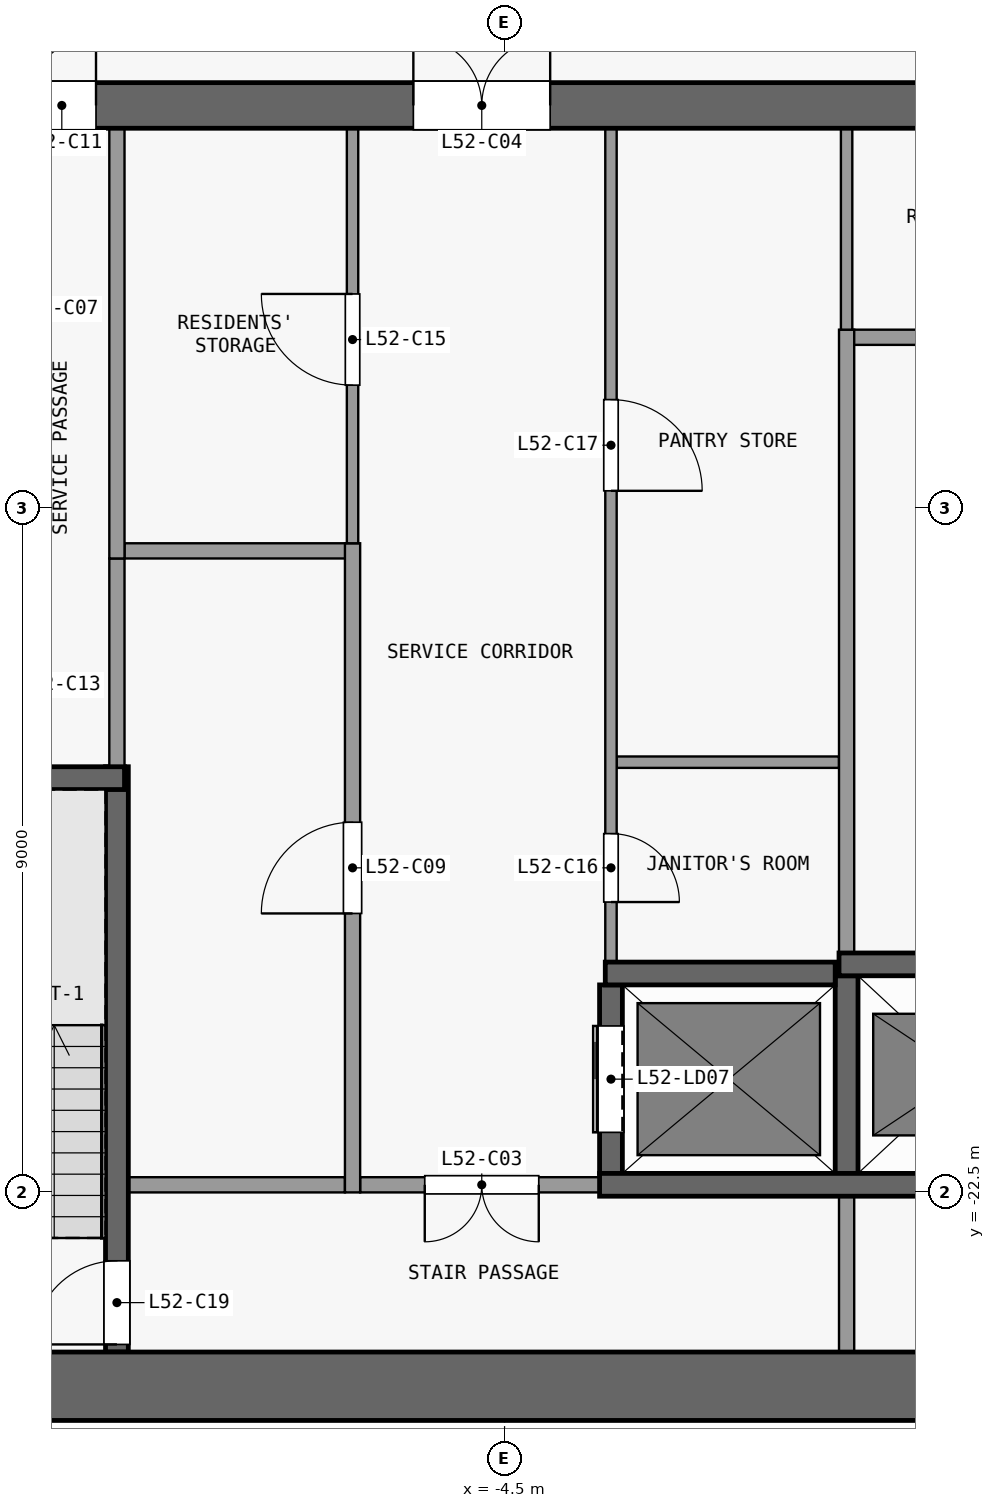
"""IFC4 building model, lengths in metres.
Left out: names, types, materials, properties, quantities, classifications, styles, units other than length and angle.
Written with IfcOpenShell. Run it as: python <this file> out.ifc"""

import sys

from ifc_helpers import new_model, si_unit, direction, frame, frame_2d, origin, place, context, subcontext, project, spatial, rectangle, extrude, element, fill, save


model = new_model("IFC4")
c1 = context("Model", 3, precision=1e-05, world=origin(), true_north=direction((0.0, 1.0)))
c2 = subcontext(c1, "Body", "Model", "MODEL_VIEW")
j1 = project(units=[si_unit("LENGTHUNIT", "METRE"), si_unit("PLANEANGLEUNIT", "RADIAN")], contexts=[c1])
p1 = place(None, origin())
s1 = spatial("IfcSite", under=j1, at=p1, CompositionType="ELEMENT")
p2 = place(p1, origin())
s2 = spatial("IfcBuilding", under=s1, at=p2, CompositionType="ELEMENT")
p3 = place(p2, frame((0.0, 0.0, 208.7)))
s3 = spatial("IfcBuildingStorey", under=s2, at=p3, CompositionType="ELEMENT", Elevation=208.7)
p4 = place(p3, frame((-13.2, -25.05, 0.0), z_axis=(0.0, 0.0, 1.0), x_axis=(1.0, 0.0, 0.0)))
e1 = element("IfcWall", 1, at=p4, inside=s3, PredefinedType="SHEAR", context=c2, shape_type="SweptSolid", body=[
    extrude(rectangle(XDim=26.4, YDim=0.9, at=frame_2d((13.2, 0.0))), origin(), (0.0, 0.0, 1.0), 3.3),
])
p5 = place(p3, frame((-13.2, -8.2, 0.0), z_axis=(0.0, 0.0, 1.0), x_axis=(1.0, 0.0, 0.0)))
e2 = element("IfcWall", 2, at=p5, inside=s3, PredefinedType="SHEAR", context=c2, shape_type="SweptSolid", body=[
    extrude(rectangle(XDim=26.4, YDim=0.6, at=frame_2d((13.2, 0.0))), origin(), (0.0, 0.0, 1.0), 3.3),
])
p6 = place(p5, frame((7.5, 0.0, 0.0)))
e3 = element("IfcOpeningElement", 3, at=p6, cuts=e2, PredefinedType="OPENING", context=c2, shape_type="SweptSolid", body=[
    extrude(rectangle(XDim=1.8, YDim=2.1, at=frame_2d((0.9, 1.05))), frame((0.0, 0.31, 0.0), z_axis=(0.0, -1.0, 0.0), x_axis=(1.0, 0.0, 0.0)), (0.0, 0.0, 1.0), 0.62),
])
p7 = place(p5, frame((17.1, 0.0, 0.0)))
e4 = element("IfcOpeningElement", 4, at=p7, cuts=e2, PredefinedType="OPENING", context=c2, shape_type="SweptSolid", body=[
    extrude(rectangle(XDim=1.8, YDim=2.1, at=frame_2d((0.9, 1.05))), frame((0.0, 0.31, 0.0), z_axis=(0.0, -1.0, 0.0), x_axis=(1.0, 0.0, 0.0)), (0.0, 0.0, 1.0), 0.62),
])
p8 = place(p5, frame((2.425, 0.0, 0.0)))
e5 = element("IfcOpeningElement", 5, at=p8, cuts=e2, PredefinedType="OPENING", context=c2, shape_type="SweptSolid", body=[
    extrude(rectangle(XDim=0.9, YDim=2.1, at=frame_2d((0.45, 1.05))), frame((0.0, 0.31, 0.0), z_axis=(0.0, -1.0, 0.0), x_axis=(1.0, 0.0, 0.0)), (0.0, 0.0, 1.0), 0.62),
])
p9 = place(p5, frame((23.075, 0.0, 0.0)))
e6 = element("IfcOpeningElement", 6, at=p9, cuts=e2, PredefinedType="OPENING", context=c2, shape_type="SweptSolid", body=[
    extrude(rectangle(XDim=0.9, YDim=2.1, at=frame_2d((0.45, 1.05))), frame((0.0, 0.31, 0.0), z_axis=(0.0, -1.0, 0.0), x_axis=(1.0, 0.0, 0.0)), (0.0, 0.0, 1.0), 0.62),
])
p10 = place(p3, frame((-9.45, -22.4, 0.0), z_axis=(0.0, 0.0, 1.0), x_axis=(1.0, 0.0, 0.0)))
e7 = element("IfcWall", 7, at=p10, inside=s3, PredefinedType="PARTITIONING", context=c2, shape_type="SweptSolid", body=[
    extrude(rectangle(XDim=2.85, YDim=0.2, at=frame_2d((1.425, 0.0))), origin(), (0.0, 0.0, 1.0), 3.3),
])
p11 = place(p3, frame((-3.25, -22.4, 0.0), z_axis=(0.0, 0.0, 1.0), x_axis=(-1.0, 0.0, 0.0)))
e8 = element("IfcWall", 8, at=p11, inside=s3, PredefinedType="PARTITIONING", context=c2, shape_type="SweptSolid", body=[
    extrude(rectangle(XDim=3.15, YDim=0.2, at=frame_2d((1.575, 0.0))), origin(), (0.0, 0.0, 1.0), 3.3),
])
p12 = place(p11, frame((0.8, 0.0, 0.0)))
e9 = element("IfcOpeningElement", 9, at=p12, cuts=e8, PredefinedType="OPENING", context=c2, shape_type="SweptSolid", body=[
    extrude(rectangle(XDim=1.5, YDim=2.1, at=frame_2d((0.75, 1.05))), frame((0.0, 0.11, 0.0), z_axis=(0.0, -1.0, 0.0), x_axis=(1.0, 0.0, 0.0)), (0.0, 0.0, 1.0), 0.22),
])
p13 = place(p3, frame((-3.25, -22.4, 0.0), z_axis=(0.0, 0.0, 1.0), x_axis=(1.0, 0.0, 0.0)))
e10 = element("IfcWall", 10, at=p13, inside=s3, PredefinedType="SHEAR", context=c2, shape_type="SweptSolid", body=[
    extrude(rectangle(XDim=6.5, YDim=0.3, at=frame_2d((3.25, 0.0))), origin(), (0.0, 0.0, 1.0), 3.3),
])
p14 = place(p3, frame((-3.175, -19.62, 0.0), z_axis=(0.0, 0.0, 1.0), x_axis=(1.0, 0.0, 0.0)))
e11 = element("IfcWall", 11, at=p14, inside=s3, PredefinedType="SHEAR", context=c2, shape_type="SweptSolid", body=[
    extrude(rectangle(XDim=3.025, YDim=0.3, at=frame_2d((1.513, 0.0))), origin(), (0.0, 0.0, 1.0), 3.3),
])
p15 = place(p3, frame((-0.1, -19.5, 0.0), z_axis=(0.0, 0.0, 1.0), x_axis=(1.0, 0.0, 0.0)))
e12 = element("IfcWall", 12, at=p15, inside=s3, PredefinedType="SHEAR", context=c2, shape_type="SweptSolid", body=[
    extrude(rectangle(XDim=3.3, YDim=0.3, at=frame_2d((1.65, 0.0))), origin(), (0.0, 0.0, 1.0), 3.3),
])
p16 = place(p3, frame((-12.6, -17.05, 0.0), z_axis=(0.0, 0.0, 1.0), x_axis=(1.0, 0.0, 0.0)))
e13 = element("IfcWall", 13, at=p16, inside=s3, PredefinedType="SHEAR", context=c2, shape_type="SweptSolid", body=[
    extrude(rectangle(XDim=3.1, YDim=0.3, at=frame_2d((1.55, 0.0))), origin(), (0.0, 0.0, 1.0), 3.3),
])
p17 = place(p3, frame((-3.025, -16.84, 0.0), z_axis=(0.0, 0.0, 1.0), x_axis=(1.0, 0.0, 0.0)))
e14 = element("IfcWall", 14, at=p17, inside=s3, PredefinedType="PARTITIONING", context=c2, shape_type="SweptSolid", body=[
    extrude(rectangle(XDim=2.925, YDim=0.15, at=frame_2d((1.462, 0.0))), origin(), (0.0, 0.0, 1.0), 3.3),
])
p18 = place(p3, frame((-9.5, -14.06, 0.0), z_axis=(0.0, 0.0, 1.0), x_axis=(1.0, 0.0, 0.0)))
e15 = element("IfcWall", 15, at=p18, inside=s3, PredefinedType="PARTITIONING", context=c2, shape_type="SweptSolid", body=[
    extrude(rectangle(XDim=3.075, YDim=0.2, at=frame_2d((1.538, 0.0))), origin(), (0.0, 0.0, 1.0), 3.3),
])
p19 = place(p3, frame((-0.075, -11.25, 0.0), z_axis=(0.0, 0.0, 1.0), x_axis=(1.0, 0.0, 0.0)))
e16 = element("IfcWall", 16, at=p19, inside=s3, PredefinedType="PARTITIONING", context=c2, shape_type="SweptSolid", body=[
    extrude(rectangle(XDim=3.25, YDim=0.2, at=frame_2d((1.625, 0.0))), origin(), (0.0, 0.0, 1.0), 3.3),
])
p20 = place(p3, frame((-9.6, -24.6, 0.0), z_axis=(0.0, 0.0, 1.0), x_axis=(0.0, 1.0, 0.0)))
e17 = element("IfcWall", 17, at=p20, inside=s3, PredefinedType="SHEAR", context=c2, shape_type="SweptSolid", body=[
    extrude(rectangle(XDim=7.7, YDim=0.3, at=frame_2d((3.85, 0.0))), origin(), (0.0, 0.0, 1.0), 3.3),
])
p21 = place(p20, frame((0.1, 0.0, 0.0)))
e18 = element("IfcOpeningElement", 18, at=p21, cuts=e17, PredefinedType="OPENING", context=c2, shape_type="SweptSolid", body=[
    extrude(rectangle(XDim=1.1, YDim=2.1, at=frame_2d((0.55, 1.05))), frame((0.0, 0.16, 0.0), z_axis=(0.0, -1.0, 0.0), x_axis=(1.0, 0.0, 0.0)), (0.0, 0.0, 1.0), 0.32),
])
p22 = place(p3, frame((-9.6, -16.9, 0.0), z_axis=(0.0, 0.0, 1.0), x_axis=(0.0, 1.0, 0.0)))
e19 = element("IfcWall", 19, at=p22, inside=s3, PredefinedType="PARTITIONING", context=c2, shape_type="SweptSolid", body=[
    extrude(rectangle(XDim=2.74, YDim=0.2, at=frame_2d((1.37, 0.0))), origin(), (0.0, 0.0, 1.0), 3.3),
])
p23 = place(p3, frame((-9.6, -14.16, 0.0), z_axis=(0.0, 0.0, 1.0), x_axis=(0.0, 1.0, 0.0)))
e20 = element("IfcWall", 20, at=p23, inside=s3, PredefinedType="PARTITIONING", context=c2, shape_type="SweptSolid", body=[
    extrude(rectangle(XDim=5.66, YDim=0.2, at=frame_2d((2.83, 0.0))), origin(), (0.0, 0.0, 1.0), 3.3),
])
p24 = place(p3, frame((-6.5, -22.5, 0.0), z_axis=(0.0, 0.0, 1.0), x_axis=(0.0, 1.0, 0.0)))
e21 = element("IfcWall", 21, at=p24, inside=s3, PredefinedType="PARTITIONING", context=c2, shape_type="SweptSolid", body=[
    extrude(rectangle(XDim=8.54, YDim=0.2, at=frame_2d((4.27, 0.0))), origin(), (0.0, 0.0, 1.0), 3.3),
])
p25 = place(p24, frame((3.67, 0.0, 0.0)))
e22 = element("IfcOpeningElement", 22, at=p25, cuts=e21, PredefinedType="OPENING", context=c2, shape_type="SweptSolid", body=[
    extrude(rectangle(XDim=1.2, YDim=2.1, at=frame_2d((0.6, 1.05))), frame((0.0, 0.11, 0.0), z_axis=(0.0, -1.0, 0.0), x_axis=(1.0, 0.0, 0.0)), (0.0, 0.0, 1.0), 0.22),
])
p26 = place(p3, frame((-6.5, -13.96, 0.0), z_axis=(0.0, 0.0, 1.0), x_axis=(0.0, 1.0, 0.0)))
e23 = element("IfcWall", 23, at=p26, inside=s3, PredefinedType="PARTITIONING", context=c2, shape_type="SweptSolid", body=[
    extrude(rectangle(XDim=5.46, YDim=0.15, at=frame_2d((2.73, 0.0))), origin(), (0.0, 0.0, 1.0), 3.3),
])
p27 = place(p26, frame((2.08, 0.0, 0.0)))
e24 = element("IfcOpeningElement", 24, at=p27, cuts=e23, PredefinedType="OPENING", context=c2, shape_type="SweptSolid", body=[
    extrude(rectangle(XDim=1.2, YDim=2.1, at=frame_2d((0.6, 1.05))), frame((0.0, 0.085, 0.0), z_axis=(0.0, -1.0, 0.0), x_axis=(1.0, 0.0, 0.0)), (0.0, 0.0, 1.0), 0.17),
])
p28 = place(p3, frame((-3.1, -22.25, 0.0), z_axis=(0.0, 0.0, 1.0), x_axis=(0.0, 1.0, 0.0)))
e25 = element("IfcWall", 25, at=p28, inside=s3, PredefinedType="SHEAR", context=c2, shape_type="SweptSolid", body=[
    extrude(rectangle(XDim=2.48, YDim=0.3, at=frame_2d((1.24, 0.0))), origin(), (0.0, 0.0, 1.0), 3.3),
])
p29 = place(p28, frame((0.54, 0.0, 0.0)))
e26 = element("IfcOpeningElement", 26, at=p29, cuts=e25, PredefinedType="OPENING", context=c2, shape_type="SweptSolid", body=[
    extrude(rectangle(XDim=1.4, YDim=2.1, at=frame_2d((0.7, 1.05))), frame((0.0, 0.16, 0.0), z_axis=(0.0, -1.0, 0.0), x_axis=(1.0, 0.0, 0.0)), (0.0, 0.0, 1.0), 0.32),
])
p30 = place(p3, frame((-3.1, -8.5, 0.0), z_axis=(0.0, 0.0, 1.0), x_axis=(0.0, -1.0, 0.0)))
e27 = element("IfcWall", 27, at=p30, inside=s3, PredefinedType="PARTITIONING", context=c2, shape_type="SweptSolid", body=[
    extrude(rectangle(XDim=10.97, YDim=0.15, at=frame_2d((5.485, 0.0))), origin(), (0.0, 0.0, 1.0), 3.3),
])
p31 = place(p30, frame((9.28, 0.0, 0.0)))
e28 = element("IfcOpeningElement", 28, at=p31, cuts=e27, PredefinedType="OPENING", context=c2, shape_type="SweptSolid", body=[
    extrude(rectangle(XDim=0.9, YDim=2.1, at=frame_2d((0.45, 1.05))), frame((0.0, 0.085, 0.0), z_axis=(0.0, -1.0, 0.0), x_axis=(1.0, 0.0, 0.0)), (0.0, 0.0, 1.0), 0.17),
])
p32 = place(p30, frame((3.57, 0.0, 0.0)))
e29 = element("IfcOpeningElement", 29, at=p32, cuts=e27, PredefinedType="OPENING", context=c2, shape_type="SweptSolid", body=[
    extrude(rectangle(XDim=1.2, YDim=2.1, at=frame_2d((0.6, 1.05))), frame((0.0, 0.085, 0.0), z_axis=(0.0, -1.0, 0.0), x_axis=(1.0, 0.0, 0.0)), (0.0, 0.0, 1.0), 0.17),
])
p33 = place(p3, frame((0.0, -24.6, 0.0), z_axis=(0.0, 0.0, 1.0), x_axis=(0.0, 1.0, 0.0)))
e30 = element("IfcWall", 30, at=p33, inside=s3, PredefinedType="PARTITIONING", context=c2, shape_type="SweptSolid", body=[
    extrude(rectangle(XDim=2.05, YDim=0.2, at=frame_2d((1.025, 0.0))), origin(), (0.0, 0.0, 1.0), 3.3),
])
p34 = place(p3, frame((0.0, -22.25, 0.0), z_axis=(0.0, 0.0, 1.0), x_axis=(0.0, 1.0, 0.0)))
e31 = element("IfcWall", 31, at=p34, inside=s3, PredefinedType="SHEAR", context=c2, shape_type="SweptSolid", body=[
    extrude(rectangle(XDim=2.6, YDim=0.3, at=frame_2d((1.3, 0.0))), origin(), (0.0, 0.0, 1.0), 3.3),
])
p35 = place(p3, frame((0.0, -19.35, 0.0), z_axis=(0.0, 0.0, 1.0), x_axis=(0.0, 1.0, 0.0)))
e32 = element("IfcWall", 32, at=p35, inside=s3, PredefinedType="PARTITIONING", context=c2, shape_type="SweptSolid", body=[
    extrude(rectangle(XDim=8.2, YDim=0.2, at=frame_2d((4.1, 0.0))), origin(), (0.0, 0.0, 1.0), 3.3),
])
p36 = place(p3, frame((0.0, -11.15, 0.0), z_axis=(0.0, 0.0, 1.0), x_axis=(0.0, 1.0, 0.0)))
e33 = element("IfcWall", 33, at=p36, inside=s3, PredefinedType="PARTITIONING", context=c2, shape_type="SweptSolid", body=[
    extrude(rectangle(XDim=2.65, YDim=0.15, at=frame_2d((1.325, 0.0))), origin(), (0.0, 0.0, 1.0), 3.3),
])
p37 = place(p29, origin())
e34 = element("IfcDoor", 34, at=p37, inside=s3, OperationType="DOUBLE_DOOR_SLIDING", PredefinedType="DOOR", context=c2, shape_type="SweptSolid", body=[
    extrude(rectangle(XDim=1.4, YDim=2.1, at=frame_2d((0.7, 1.05))), frame((0.0, 0.025, 0.0), z_axis=(0.0, -1.0, 0.0), x_axis=(1.0, 0.0, 0.0)), (0.0, 0.0, 1.0), 0.05),
])
fill(e26, e34)
p38 = place(p12, origin())
e35 = element("IfcDoor", 35, at=p38, inside=s3, OperationType="DOUBLE_DOOR_SINGLE_SWING", PredefinedType="DOOR", context=c2, shape_type="SweptSolid", body=[
    extrude(rectangle(XDim=1.5, YDim=2.1, at=frame_2d((0.75, 1.05))), frame((0.0, 0.025, 0.0), z_axis=(0.0, -1.0, 0.0), x_axis=(1.0, 0.0, 0.0)), (0.0, 0.0, 1.0), 0.05),
])
fill(e9, e35)
p39 = place(p6, origin())
e36 = element("IfcDoor", 36, at=p39, inside=s3, OperationType="DOUBLE_DOOR_SINGLE_SWING", PredefinedType="DOOR", context=c2, shape_type="SweptSolid", body=[
    extrude(rectangle(XDim=1.8, YDim=2.1, at=frame_2d((0.9, 1.05))), frame((0.0, 0.025, 0.0), z_axis=(0.0, -1.0, 0.0), x_axis=(1.0, 0.0, 0.0)), (0.0, 0.0, 1.0), 0.05),
])
fill(e3, e36)
p40 = place(p25, origin())
e37 = element("IfcDoor", 37, at=p40, inside=s3, OperationType="SINGLE_SWING_LEFT", PredefinedType="DOOR", context=c2, shape_type="SweptSolid", body=[
    extrude(rectangle(XDim=1.2, YDim=2.1, at=frame_2d((0.6, 1.05))), frame((0.0, 0.025, 0.0), z_axis=(0.0, -1.0, 0.0), x_axis=(1.0, 0.0, 0.0)), (0.0, 0.0, 1.0), 0.05),
])
fill(e22, e37)
p41 = place(p8, origin())
e38 = element("IfcDoor", 38, at=p41, inside=s3, OperationType="SINGLE_SWING_RIGHT", PredefinedType="DOOR", context=c2, shape_type="SweptSolid", body=[
    extrude(rectangle(XDim=0.9, YDim=2.1, at=frame_2d((0.45, 1.05))), frame((0.0, 0.025, 0.0), z_axis=(0.0, -1.0, 0.0), x_axis=(1.0, 0.0, 0.0)), (0.0, 0.0, 1.0), 0.05),
])
fill(e5, e38)
p42 = place(p27, origin())
e39 = element("IfcDoor", 39, at=p42, inside=s3, OperationType="SINGLE_SWING_RIGHT", PredefinedType="DOOR", context=c2, shape_type="SweptSolid", body=[
    extrude(rectangle(XDim=1.2, YDim=2.1, at=frame_2d((0.6, 1.05))), frame((0.0, 0.025, 0.0), z_axis=(0.0, -1.0, 0.0), x_axis=(1.0, 0.0, 0.0)), (0.0, 0.0, 1.0), 0.05),
])
fill(e24, e39)
p43 = place(p31, origin())
e40 = element("IfcDoor", 40, at=p43, inside=s3, OperationType="SINGLE_SWING_RIGHT", PredefinedType="DOOR", context=c2, shape_type="SweptSolid", body=[
    extrude(rectangle(XDim=0.9, YDim=2.1, at=frame_2d((0.45, 1.05))), frame((0.0, 0.025, 0.0), z_axis=(0.0, -1.0, 0.0), x_axis=(1.0, 0.0, 0.0)), (0.0, 0.0, 1.0), 0.05),
])
fill(e28, e40)
p44 = place(p32, origin())
e41 = element("IfcDoor", 41, at=p44, inside=s3, OperationType="SINGLE_SWING_RIGHT", PredefinedType="DOOR", context=c2, shape_type="SweptSolid", body=[
    extrude(rectangle(XDim=1.2, YDim=2.1, at=frame_2d((0.6, 1.05))), frame((0.0, 0.025, 0.0), z_axis=(0.0, -1.0, 0.0), x_axis=(1.0, 0.0, 0.0)), (0.0, 0.0, 1.0), 0.05),
])
fill(e29, e41)
p45 = place(p21, origin())
e42 = element("IfcDoor", 42, at=p45, inside=s3, OperationType="SINGLE_SWING_LEFT", PredefinedType="DOOR", context=c2, shape_type="SweptSolid", body=[
    extrude(rectangle(XDim=1.1, YDim=2.1, at=frame_2d((0.55, 1.05))), frame((0.0, 0.025, 0.0), z_axis=(0.0, -1.0, 0.0), x_axis=(1.0, 0.0, 0.0)), (0.0, 0.0, 1.0), 0.05),
])
fill(e18, e42)
save(model, sys.argv[1])
